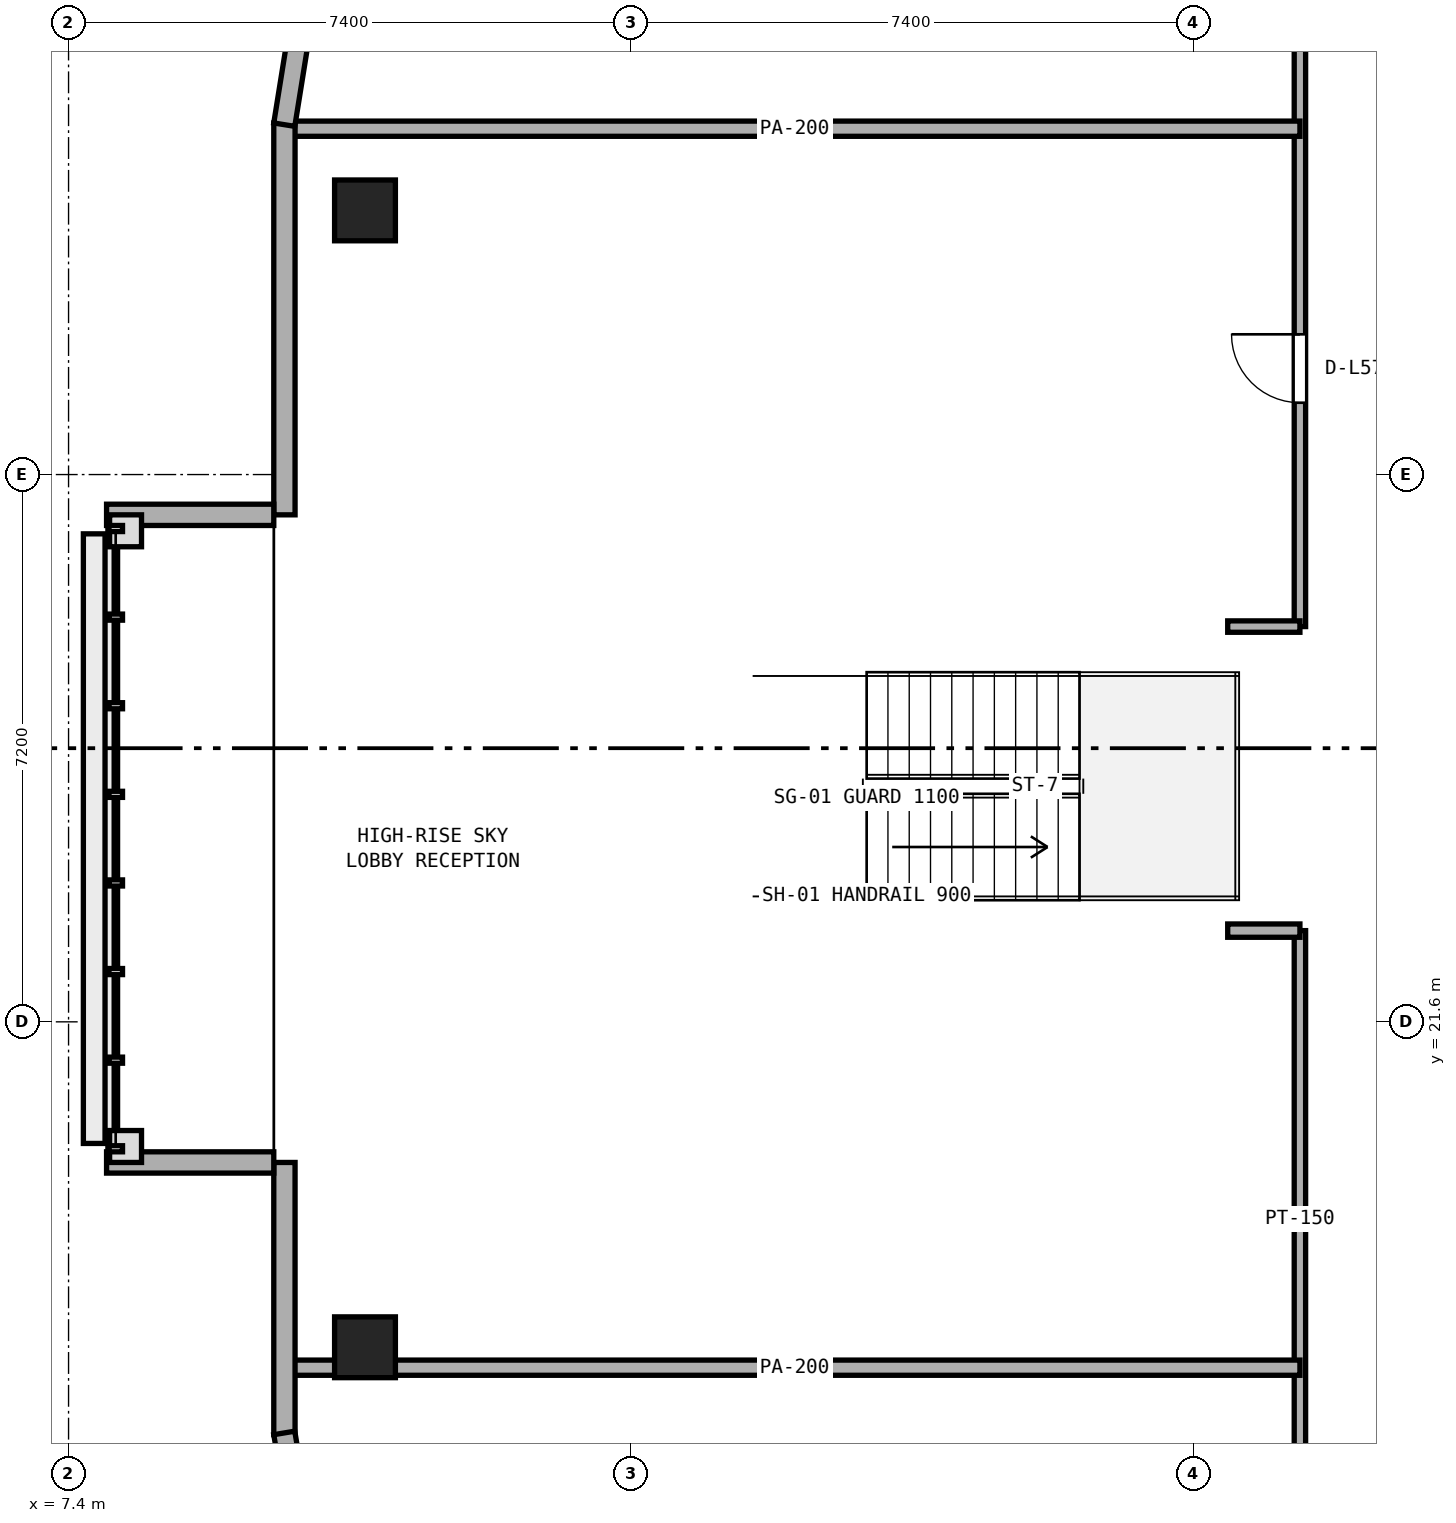
"""IFC4 building model, lengths in metres.
Left out: names, types, materials, properties, quantities, classifications, styles, units other than length and angle.
Written with IfcOpenShell. Run it as: python <this file> out.ifc"""

import sys

from ifc_helpers import new_model, si_unit, direction, frame, frame_2d, origin, origin_2d, place, context, subcontext, project, spatial, rectangle, extrude, element, fill, save


model = new_model("IFC4")
c1 = context("Model", 3, precision=1e-05, world=origin(), true_north=direction((0.0, 1.0)))
c2 = subcontext(c1, "Body", "Model", "MODEL_VIEW")
j1 = project(units=[si_unit("LENGTHUNIT", "METRE"), si_unit("PLANEANGLEUNIT", "RADIAN")], contexts=[c1])
p1 = place(None, origin())
s1 = spatial("IfcSite", under=j1, at=p1, CompositionType="ELEMENT")
p2 = place(p1, origin())
s2 = spatial("IfcBuilding", under=s1, at=p2, CompositionType="ELEMENT")
p3 = place(p2, frame((0.0, 0.0, 225.0)))
s3 = spatial("IfcBuildingStorey", under=s2, at=p3, CompositionType="ELEMENT", Elevation=225.0)
for number, where, z_axis, x_axis in (
    (1, (11.3, 32.275, 0.0), (0.0, 0.0, 1.0), (1.0, 0.0, 0.0)),
    (2, (11.3, 17.319, 0.0), (0.0, 0.0, 1.0), (1.0, 0.0, 0.0)),
):
    element("IfcColumn", number, at=place(p3, frame(where, z_axis=z_axis, x_axis=x_axis)), inside=s3, PredefinedType="COLUMN", context=c2, shape_type="SweptSolid", body=[
        extrude(rectangle(XDim=0.8, YDim=0.8, at=origin_2d()), origin(), (0.0, 0.0, 1.0), 3.8),
    ])
p4 = place(p3, frame((23.6, 15.2, 0.0), z_axis=(0.0, 0.0, 1.0), x_axis=(0.0, 1.0, 0.0)))
e3 = element("IfcWall", 3, at=p4, inside=s3, PredefinedType="PARTITIONING", context=c2, shape_type="SweptSolid", body=[
    extrude(rectangle(XDim=7.6, YDim=0.15, at=frame_2d((3.8, 0.0))), origin(), (0.0, 0.0, 1.0), 3.51),
])
p5 = place(p3, frame((23.6, 26.8, 0.0), z_axis=(0.0, 0.0, 1.0), x_axis=(0.0, 1.0, 0.0)))
e4 = element("IfcWall", 4, at=p5, inside=s3, PredefinedType="PARTITIONING", context=c2, shape_type="SweptSolid", body=[
    extrude(rectangle(XDim=8.4, YDim=0.15, at=frame_2d((4.2, 0.0))), origin(), (0.0, 0.0, 1.0), 3.51),
])
p6 = place(p5, frame((2.945, 0.0, 0.0)))
e5 = element("IfcOpeningElement", 5, at=p6, cuts=e4, PredefinedType="OPENING", context=c2, shape_type="SweptSolid", body=[
    extrude(rectangle(XDim=0.9, YDim=2.1, at=frame_2d((0.45, 1.05))), frame((0.0, 0.085, 0.0), z_axis=(0.0, -1.0, 0.0), x_axis=(1.0, 0.0, 0.0)), (0.0, 0.0, 1.0), 0.17),
])
p7 = place(p3, frame((10.305, 17.05, 0.0), z_axis=(0.0, 0.0, 1.0), x_axis=(1.0, 0.0, 0.0)))
e6 = element("IfcWall", 6, at=p7, inside=s3, PredefinedType="PARTITIONING", context=c2, shape_type="SweptSolid", body=[
    extrude(rectangle(XDim=13.295, YDim=0.2, at=frame_2d((6.647, 0.0))), origin(), (0.0, 0.0, 1.0), 3.51),
])
p8 = place(p3, frame((22.65, 22.8, 0.0), z_axis=(0.0, 0.0, 1.0), x_axis=(1.0, 0.0, 0.0)))
e7 = element("IfcWall", 7, at=p8, inside=s3, PredefinedType="PARTITIONING", context=c2, shape_type="SweptSolid", body=[
    extrude(rectangle(XDim=0.95, YDim=0.175, at=frame_2d((0.475, 0.0))), origin(), (0.0, 0.0, 1.0), 3.51),
])
p9 = place(p3, frame((22.65, 26.8, 0.0), z_axis=(0.0, 0.0, 1.0), x_axis=(1.0, 0.0, 0.0)))
e8 = element("IfcWall", 8, at=p9, inside=s3, PredefinedType="PARTITIONING", context=c2, shape_type="SweptSolid", body=[
    extrude(rectangle(XDim=0.95, YDim=0.15, at=frame_2d((0.475, 0.0))), origin(), (0.0, 0.0, 1.0), 3.51),
])
p10 = place(p3, frame((10.305, 33.35, 0.0), z_axis=(0.0, 0.0, 1.0), x_axis=(1.0, 0.0, 0.0)))
e9 = element("IfcWall", 9, at=p10, inside=s3, PredefinedType="PARTITIONING", context=c2, shape_type="SweptSolid", body=[
    extrude(rectangle(XDim=13.295, YDim=0.2, at=frame_2d((6.647, 0.0))), origin(), (0.0, 0.0, 1.0), 3.51),
])
p11 = place(p3, frame((10.24, 33.425, 0.0), z_axis=(0.0, 0.0, 1.0), x_axis=(0.0, -1.0, 0.0)))
e10 = element("IfcWall", 10, at=p11, inside=s3, PredefinedType="STANDARD", context=c2, shape_type="SweptSolid", body=[
    extrude(rectangle(XDim=5.155, YDim=0.28, at=frame_2d((2.578, 0.0))), origin(), (0.0, 0.0, 1.0), 3.51),
])
p12 = place(p3, frame((10.24, 19.75, 0.0), z_axis=(0.0, 0.0, 1.0), x_axis=(0.0, -1.0, 0.0)))
e11 = element("IfcWall", 11, at=p12, inside=s3, PredefinedType="STANDARD", context=c2, shape_type="SweptSolid", body=[
    extrude(rectangle(XDim=3.581, YDim=0.28, at=frame_2d((1.791, 0.0))), origin(), (0.0, 0.0, 1.0), 3.51),
])
p13 = place(p3, frame((10.445, 34.688, 0.0), z_axis=(0.0, 0.0, 1.0), x_axis=(-0.158524605336, -0.987355027081, 0.0)))
e12 = element("IfcWall", 12, at=p13, inside=s3, PredefinedType="STANDARD", context=c2, shape_type="SweptSolid", body=[
    extrude(rectangle(XDim=1.301, YDim=0.28, at=frame_2d((0.651, 0.0))), origin(), (0.0, 0.0, 1.0), 3.51),
])
p14 = place(p3, frame((10.238, 16.192, 0.0), z_axis=(0.0, 0.0, 1.0), x_axis=(0.164604311367, -0.986359681191, 0.0)))
e13 = element("IfcWall", 13, at=p14, inside=s3, PredefinedType="STANDARD", context=c2, shape_type="SweptSolid", body=[
    extrude(rectangle(XDim=1.35, YDim=0.28, at=frame_2d((0.675, 0.0))), origin(), (0.0, 0.0, 1.0), 3.51),
])
for number, where, z_axis, x_axis in (
    (14, (7.9, 19.75, 0.0), (0.0, 0.0, 1.0), (1.0, 0.0, 0.0)),
    (15, (7.9, 28.27, 0.0), (0.0, 0.0, 1.0), (1.0, 0.0, 0.0)),
):
    element("IfcWall", number, at=place(p3, frame(where, z_axis=z_axis, x_axis=x_axis)), inside=s3, PredefinedType="STANDARD", context=c2, shape_type="SweptSolid", body=[
        extrude(rectangle(XDim=2.2, YDim=0.28, at=frame_2d((1.1, 0.0))), origin(), (0.0, 0.0, 1.0), 3.51),
    ])
p15 = place(p6, origin())
e16 = element("IfcDoor", 16, at=p15, inside=s3, OperationType="SINGLE_SWING_RIGHT", PredefinedType="DOOR", context=c2, shape_type="SweptSolid", body=[
    extrude(rectangle(XDim=0.9, YDim=2.1, at=frame_2d((0.45, 1.05))), frame((0.0, 0.025, 0.0), z_axis=(0.0, -1.0, 0.0), x_axis=(1.0, 0.0, 0.0)), (0.0, 0.0, 1.0), 0.05),
])
fill(e5, e16)
save(model, sys.argv[1])
